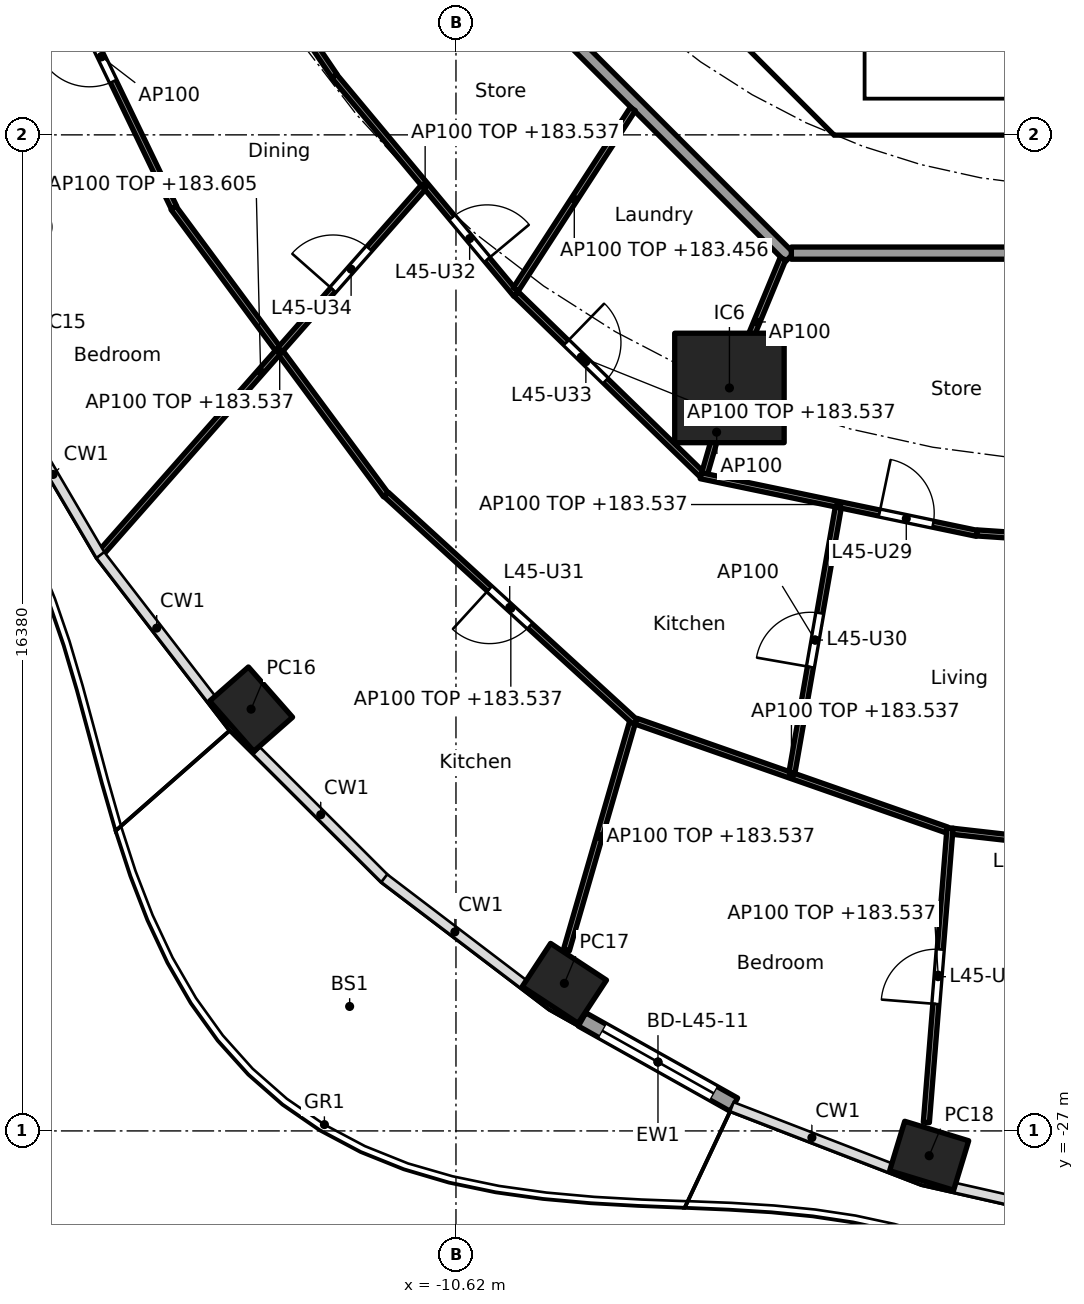
"""IFC4 building model, lengths in metres.
Left out: names, types, materials, properties, quantities, classifications, styles, units other than length and angle.
Written with IfcOpenShell. Run it as: python <this file> out.ifc"""

import sys

from ifc_helpers import new_model, si_unit, direction, frame, frame_2d, origin, origin_2d, place, context, subcontext, project, spatial, polyline, rectangle, hollow_rectangle, outline, extrude, element, fill, save


model = new_model("IFC4")
c1 = context("Model", 3, precision=1e-05, world=origin(), true_north=direction((0.0, 1.0)))
c2 = subcontext(c1, "Body", "Model", "MODEL_VIEW")
j1 = project(units=[si_unit("LENGTHUNIT", "METRE"), si_unit("PLANEANGLEUNIT", "RADIAN")], contexts=[c1])
p1 = place(None, origin())
s1 = spatial("IfcSite", under=j1, at=p1, CompositionType="ELEMENT")
p2 = place(p1, origin())
s2 = spatial("IfcBuilding", under=s1, at=p2, CompositionType="ELEMENT")
p3 = place(p2, frame((0.0, 0.0, 180.7)))
s3 = spatial("IfcBuildingStorey", under=s2, at=p3, CompositionType="ELEMENT", Elevation=180.7)
for number, where, z_axis, x_axis in (
    (1, (-13.989, -20.064, 0.0), (0.0, 0.0, 1.0), (0.66, -0.751, 0.0)),
    (2, (-8.837, -24.573, 0.0), (0.0, 0.0, 1.0), (0.836, -0.549, 0.0)),
    (3, (-2.838, -27.408, 0.0), (0.0, 0.0, 1.0), (0.957, -0.292, 0.0)),
):
    element("IfcColumn", number, at=place(p3, frame(where, z_axis=z_axis, x_axis=x_axis)), inside=s3, PredefinedType="COLUMN", context=c2, shape_type="SweptSolid", body=[
        extrude(hollow_rectangle(XDim=1.1, YDim=0.85, WallThickness=0.036, at=origin_2d()), origin(), (0.0, 0.0, 1.0), 3.7),
    ])
p4 = place(p3, frame((-6.123, -14.782, 0.0), z_axis=(0.0, 0.0, 1.0), x_axis=(1.0, 0.0, 0.0)))
e4 = element("IfcColumn", 4, at=p4, inside=s3, PredefinedType="COLUMN", context=c2, shape_type="SweptSolid", body=[
    extrude(rectangle(XDim=1.8, YDim=1.8, at=origin_2d()), origin(), (0.0, 0.0, 1.0), 3.7),
])
p5 = place(p3, frame((-6.049, -26.568, 0.0), z_axis=(0.0, 0.0, 1.0), x_axis=(-0.872078262455, 0.489366431371, 0.0)))
e5 = element("IfcWall", 5, at=p5, inside=s3, PredefinedType="SOLIDWALL", context=c2, shape_type="SweptSolid", body=[
    extrude(rectangle(XDim=2.864, YDim=0.25, at=frame_2d((1.432, 0.0))), origin(), (0.0, 0.0, 1.0), 3.44),
])
p6 = place(p5, frame((0.382, 0.0, 0.0)))
e6 = element("IfcOpeningElement", 6, at=p6, cuts=e5, PredefinedType="OPENING", context=c2, shape_type="SweptSolid", body=[
    extrude(rectangle(XDim=2.1, YDim=2.4, at=frame_2d((1.05, 1.2))), frame((0.0, 0.135, 0.0), z_axis=(0.0, -1.0, 0.0), x_axis=(1.0, 0.0, 0.0)), (0.0, 0.0, 1.0), 0.27),
])
p7 = place(p3, frame((-9.988, -4.613, 0.0), z_axis=(0.0, 0.0, 1.0), x_axis=(0.707106781187, -0.707106781187, 0.0)))
e7 = element("IfcWall", 7, at=p7, inside=s3, PredefinedType="SHEAR", context=c2, shape_type="SweptSolid", body=[
    extrude(rectangle(XDim=7.602, YDim=0.6, at=frame_2d((3.801, 0.0))), origin(), (0.0, 0.0, 1.0), 3.44),
])
p8 = place(p7, frame((6.151, 0.0, 0.0)))
e8 = element("IfcOpeningElement", 8, at=p8, cuts=e7, PredefinedType="OPENING", context=c2, shape_type="SweptSolid", body=[
    extrude(rectangle(XDim=1.1, YDim=2.1, at=frame_2d((0.55, 1.05))), frame((0.0, 0.31, 0.0), z_axis=(0.0, -1.0, 0.0), x_axis=(1.0, 0.0, 0.0)), (0.0, 0.0, 1.0), 0.62),
])
p9 = place(p3, origin())
e9 = element("IfcWall", 9, at=p9, inside=s3, PredefinedType="SHEAR", context=c2, shape_type="SweptSolid", body=[
    extrude(outline(polyline([(-4.152, -10.025), (4.152, -10.025), (4.401, -9.776), (4.825, -10.2), (4.401, -10.625), (-4.401, -10.625), (-4.825, -10.2), (-4.401, -9.776), (-4.152, -10.025)])), origin(), (0.0, 0.0, 1.0), 3.44),
])
p10 = place(p3, origin())
e10 = element("IfcWall", 10, at=p10, inside=s3, PredefinedType="SOLIDWALL", context=c2, shape_type="SweptSolid", body=[
    extrude(outline(polyline([(-3.9, -10.025), (-4.1, -10.025), (-4.1, -7.025), (-3.9, -7.025), (-3.9, -10.025)])), origin(), (0.0, 0.0, 1.0), 3.44),
])
p11 = place(p3, frame((-12.635, -5.134, 0.0), z_axis=(0.0, 0.0, 1.0), x_axis=(0.707106781187, -0.707106781187, 0.0)))
e11 = element("IfcWall", 11, at=p11, inside=s3, PredefinedType="PARTITIONING", context=c2, shape_type="SweptSolid", body=[
    extrude(rectangle(XDim=10.609, YDim=0.2, at=frame_2d((5.305, 0.0))), origin(), (0.0, 0.0, 1.0), 3.44),
])
p12 = place(p3, frame((-5.104, -12.565, 0.0), z_axis=(0.0, 0.0, 1.0), x_axis=(1.0, 0.0, 0.0)))
e12 = element("IfcWall", 12, at=p12, inside=s3, PredefinedType="PARTITIONING", context=c2, shape_type="SweptSolid", body=[
    extrude(rectangle(XDim=10.409, YDim=0.2, at=frame_2d((5.205, 0.0))), origin(), (0.0, 0.0, 1.0), 3.44),
])
p13 = place(p12, frame((8.074, 0.0, 0.0)))
e13 = element("IfcOpeningElement", 13, at=p13, cuts=e12, PredefinedType="OPENING", context=c2, shape_type="SweptSolid", body=[
    extrude(rectangle(XDim=1.0, YDim=2.1, at=frame_2d((0.5, 1.05))), frame((0.0, 0.11, 0.0), z_axis=(0.0, -1.0, 0.0), x_axis=(1.0, 0.0, 0.0)), (0.0, 0.0, 1.0), 0.22),
])
p14 = place(p3, frame((-14.924, -6.249, 0.0), z_axis=(0.0, 0.0, 1.0), x_axis=(0.561046521684, -0.82778427172, 0.0)))
e14 = element("IfcWall", 14, at=p14, inside=s3, PredefinedType="PARTITIONING", context=c2, shape_type="SweptSolid", body=[
    extrude(rectangle(XDim=4.109, YDim=0.1, at=frame_2d((2.054, 0.0))), origin(), (0.0, 0.0, 1.0), 3.44),
])
p15 = place(p3, frame((-17.647, -6.854, 0.0), z_axis=(0.0, 0.0, 1.0), x_axis=(0.434027506504, -0.900899619046, 0.0)))
e15 = element("IfcWall", 15, at=p15, inside=s3, PredefinedType="PARTITIONING", context=c2, shape_type="SweptSolid", body=[
    extrude(rectangle(XDim=5.508, YDim=0.1, at=frame_2d((2.754, 0.0))), origin(), (0.0, 0.0, 1.0), 3.44),
])
p16 = place(p15, frame((2.304, 0.0, 0.0)))
e16 = element("IfcOpeningElement", 16, at=p16, cuts=e15, PredefinedType="OPENING", context=c2, shape_type="SweptSolid", body=[
    extrude(rectangle(XDim=0.9, YDim=2.1, at=frame_2d((0.45, 1.05))), frame((0.0, 0.06, 0.0), z_axis=(0.0, -1.0, 0.0), x_axis=(1.0, 0.0, 0.0)), (0.0, 0.0, 1.0), 0.12),
])
p17 = place(p3, frame((-12.623, -9.653, 0.0), z_axis=(0.0, 0.0, 1.0), x_axis=(0.640297481347, -0.768127030758, 0.0)))
e17 = element("IfcWall", 17, at=p17, inside=s3, PredefinedType="PARTITIONING", context=c2, shape_type="SweptSolid", body=[
    extrude(rectangle(XDim=4.672, YDim=0.1, at=frame_2d((2.336, 0.0))), origin(), (0.0, 0.0, 1.0), 2.837),
])
p18 = place(p17, frame((3.029, 0.0, 0.0)))
e18 = element("IfcOpeningElement", 18, at=p18, cuts=e17, PredefinedType="OPENING", context=c2, shape_type="SweptSolid", body=[
    extrude(rectangle(XDim=0.9, YDim=2.1, at=frame_2d((0.45, 1.05))), frame((0.0, 0.06, 0.0), z_axis=(0.0, -1.0, 0.0), x_axis=(1.0, 0.0, 0.0)), (0.0, 0.0, 1.0), 0.12),
])
p19 = place(p3, frame((-15.265, -11.821, 0.0), z_axis=(0.0, 0.0, 1.0), x_axis=(0.594711348772, -0.803939308432, 0.0)))
e19 = element("IfcWall", 19, at=p19, inside=s3, PredefinedType="PARTITIONING", context=c2, shape_type="SweptSolid", body=[
    extrude(rectangle(XDim=5.872, YDim=0.1, at=frame_2d((2.936, 0.0))), origin(), (0.0, 0.0, 1.0), 2.837),
])
p20 = place(p3, frame((-11.16, -11.485, 0.0), z_axis=(0.0, 0.0, 1.0), x_axis=(-0.661275898802, -0.750142776852, 0.0)))
e20 = element("IfcWall", 20, at=p20, inside=s3, PredefinedType="PARTITIONING", context=c2, shape_type="SweptSolid", body=[
    extrude(rectangle(XDim=8.083, YDim=0.1, at=frame_2d((4.041, 0.0))), origin(), (0.0, 0.0, 1.0), 2.905),
])
p21 = place(p20, frame((1.341, 0.0, 0.0)))
e21 = element("IfcOpeningElement", 21, at=p21, cuts=e20, PredefinedType="OPENING", context=c2, shape_type="SweptSolid", body=[
    extrude(rectangle(XDim=0.9, YDim=2.1, at=frame_2d((0.45, 1.05))), frame((0.0, 0.06, 0.0), z_axis=(0.0, -1.0, 0.0), x_axis=(1.0, 0.0, 0.0)), (0.0, 0.0, 1.0), 0.12),
])
p22 = place(p3, frame((-7.712, -10.195, 0.0), z_axis=(0.0, 0.0, 1.0), x_axis=(-0.544170086001, -0.838974920663, 0.0)))
e22 = element("IfcWall", 22, at=p22, inside=s3, PredefinedType="PARTITIONING", context=c2, shape_type="SweptSolid", body=[
    extrude(rectangle(XDim=3.535, YDim=0.1, at=frame_2d((1.768, 0.0))), origin(), (0.0, 0.0, 1.0), 2.756),
])
p23 = place(p3, frame((-9.627, -13.238, 0.0), z_axis=(0.0, 0.0, 1.0), x_axis=(0.716946269374, -0.697128429223, 0.0)))
e23 = element("IfcWall", 23, at=p23, inside=s3, PredefinedType="PARTITIONING", context=c2, shape_type="SweptSolid", body=[
    extrude(rectangle(XDim=4.25, YDim=0.1, at=frame_2d((2.125, 0.0))), origin(), (0.0, 0.0, 1.0), 2.837),
])
p24 = place(p23, frame((1.145, 0.0, 0.0)))
e24 = element("IfcOpeningElement", 24, at=p24, cuts=e23, PredefinedType="OPENING", context=c2, shape_type="SweptSolid", body=[
    extrude(rectangle(XDim=0.9, YDim=2.1, at=frame_2d((0.45, 1.05))), frame((0.0, 0.06, 0.0), z_axis=(0.0, -1.0, 0.0), x_axis=(1.0, 0.0, 0.0)), (0.0, 0.0, 1.0), 0.12),
])
p25 = place(p3, frame((-11.766, -16.535, 0.0), z_axis=(0.0, 0.0, 1.0), x_axis=(0.738053852169, -0.674741810842, 0.0)))
e25 = element("IfcWall", 25, at=p25, inside=s3, PredefinedType="PARTITIONING", context=c2, shape_type="SweptSolid", body=[
    extrude(rectangle(XDim=5.549, YDim=0.1, at=frame_2d((2.774, 0.0))), origin(), (0.0, 0.0, 1.0), 2.837),
])
p26 = place(p25, frame((2.3, 0.0, 0.0)))
e26 = element("IfcOpeningElement", 26, at=p26, cuts=e25, PredefinedType="OPENING", context=c2, shape_type="SweptSolid", body=[
    extrude(rectangle(XDim=0.9, YDim=2.1, at=frame_2d((0.45, 1.05))), frame((0.0, 0.06, 0.0), z_axis=(0.0, -1.0, 0.0), x_axis=(1.0, 0.0, 0.0)), (0.0, 0.0, 1.0), 0.12),
])
p27 = place(p3, frame((-5.243, -12.657, 0.0), z_axis=(0.0, 0.0, 1.0), x_axis=(-0.382719158442, -0.923864733477, 0.0)))
e27 = element("IfcWall", 27, at=p27, inside=s3, PredefinedType="PARTITIONING", context=c2, shape_type="SweptSolid", body=[
    extrude(rectangle(XDim=2.25, YDim=0.1, at=frame_2d((1.125, 0.0))), origin(), (0.0, 0.0, 1.0), 3.44),
])
p28 = place(p3, frame((-6.137, -14.831, 0.0), z_axis=(0.0, 0.0, 1.0), x_axis=(-0.2785069197, -0.960434222464, 0.0)))
e28 = element("IfcWall", 28, at=p28, inside=s3, PredefinedType="PARTITIONING", context=c2, shape_type="SweptSolid", body=[
    extrude(rectangle(XDim=1.413, YDim=0.1, at=frame_2d((0.707, 0.0))), origin(), (0.0, 0.0, 1.0), 3.44),
])
p29 = place(p3, frame((-6.594, -16.226, 0.0), z_axis=(0.0, 0.0, 1.0), x_axis=(0.978899284405, -0.204343316484, 0.0)))
e29 = element("IfcWall", 29, at=p29, inside=s3, PredefinedType="PARTITIONING", context=c2, shape_type="SweptSolid", body=[
    extrude(rectangle(XDim=4.636, YDim=0.1, at=frame_2d((2.318, 0.0))), origin(), (0.0, 0.0, 1.0), 2.837),
])
p30 = place(p29, frame((3.002, 0.0, 0.0)))
e30 = element("IfcOpeningElement", 30, at=p30, cuts=e29, PredefinedType="OPENING", context=c2, shape_type="SweptSolid", body=[
    extrude(rectangle(XDim=0.9, YDim=2.1, at=frame_2d((0.45, 1.05))), frame((0.0, 0.06, 0.0), z_axis=(0.0, -1.0, 0.0), x_axis=(1.0, 0.0, 0.0)), (0.0, 0.0, 1.0), 0.12),
])
p31 = place(p3, frame((-7.721, -20.293, 0.0), z_axis=(0.0, 0.0, 1.0), x_axis=(-0.278445616281, -0.960451997121, 0.0)))
e31 = element("IfcWall", 31, at=p31, inside=s3, PredefinedType="PARTITIONING", context=c2, shape_type="SweptSolid", body=[
    extrude(rectangle(XDim=3.885, YDim=0.1, at=frame_2d((1.942, 0.0))), origin(), (0.0, 0.0, 1.0), 2.837),
])
p32 = place(p3, frame((-7.66, -20.262, 0.0), z_axis=(0.0, 0.0, 1.0), x_axis=(0.943911038661, -0.330199865375, 0.0)))
e32 = element("IfcWall", 32, at=p32, inside=s3, PredefinedType="PARTITIONING", context=c2, shape_type="SweptSolid", body=[
    extrude(rectangle(XDim=5.417, YDim=0.1, at=frame_2d((2.709, 0.0))), origin(), (0.0, 0.0, 1.0), 2.837),
])
p33 = place(p3, frame((-4.333, -16.749, 0.0), z_axis=(0.0, 0.0, 1.0), x_axis=(-0.172053721569, -0.985087568135, 0.0)))
e33 = element("IfcWall", 33, at=p33, inside=s3, PredefinedType="PARTITIONING", context=c2, shape_type="SweptSolid", body=[
    extrude(rectangle(XDim=4.424, YDim=0.1, at=frame_2d((2.212, 0.0))), origin(), (0.0, 0.0, 1.0), 3.44),
])
p34 = place(p33, frame((1.762, 0.0, 0.0)))
e34 = element("IfcOpeningElement", 34, at=p34, cuts=e33, PredefinedType="OPENING", context=c2, shape_type="SweptSolid", body=[
    extrude(rectangle(XDim=0.9, YDim=2.1, at=frame_2d((0.45, 1.05))), frame((0.0, 0.06, 0.0), z_axis=(0.0, -1.0, 0.0), x_axis=(1.0, 0.0, 0.0)), (0.0, 0.0, 1.0), 0.12),
])
p35 = place(p3, frame((-2.055, -17.166, 0.0), z_axis=(0.0, 0.0, 1.0), x_axis=(0.997754717554, -0.066974051687, 0.0)))
e35 = element("IfcWall", 35, at=p35, inside=s3, PredefinedType="PARTITIONING", context=c2, shape_type="SweptSolid", body=[
    extrude(rectangle(XDim=4.309, YDim=0.1, at=frame_2d((2.154, 0.0))), origin(), (0.0, 0.0, 1.0), 2.837),
])
p36 = place(p3, frame((-2.495, -22.017, 0.0), z_axis=(0.0, 0.0, 1.0), x_axis=(-0.080150660566, -0.99678276049, 0.0)))
e36 = element("IfcWall", 36, at=p36, inside=s3, PredefinedType="PARTITIONING", context=c2, shape_type="SweptSolid", body=[
    extrude(rectangle(XDim=4.858, YDim=0.1, at=frame_2d((2.429, 0.0))), origin(), (0.0, 0.0, 1.0), 2.837),
])
p37 = place(p36, frame((2.004, 0.0, 0.0)))
e37 = element("IfcOpeningElement", 37, at=p37, cuts=e36, PredefinedType="OPENING", context=c2, shape_type="SweptSolid", body=[
    extrude(rectangle(XDim=0.9, YDim=2.1, at=frame_2d((0.45, 1.05))), frame((0.0, 0.06, 0.0), z_axis=(0.0, -1.0, 0.0), x_axis=(1.0, 0.0, 0.0)), (0.0, 0.0, 1.0), 0.12),
])
p38 = place(p3, frame((-2.449, -22.073, 0.0), z_axis=(0.0, 0.0, 1.0), x_axis=(0.993660315081, -0.112424099879, 0.0)))
e38 = element("IfcWall", 38, at=p38, inside=s3, PredefinedType="PARTITIONING", context=c2, shape_type="SweptSolid", body=[
    extrude(rectangle(XDim=5.325, YDim=0.1, at=frame_2d((2.662, 0.0))), origin(), (0.0, 0.0, 1.0), 2.837),
])
p39 = place(p38, frame((0.881, 0.0, 0.0)))
e39 = element("IfcOpeningElement", 39, at=p39, cuts=e38, PredefinedType="OPENING", context=c2, shape_type="SweptSolid", body=[
    extrude(rectangle(XDim=0.9, YDim=2.1, at=frame_2d((0.45, 1.05))), frame((0.0, 0.06, 0.0), z_axis=(0.0, -1.0, 0.0), x_axis=(1.0, 0.0, 0.0)), (0.0, 0.0, 1.0), 0.12),
])
p40 = place(p6, origin())
e40 = element("IfcDoor", 40, at=p40, inside=s3, OperationType="SLIDING_TO_LEFT", PredefinedType="DOOR", context=c2, shape_type="SweptSolid", body=[
    extrude(rectangle(XDim=2.1, YDim=2.4, at=frame_2d((1.05, 1.2))), frame((0.0, 0.025, 0.0), z_axis=(0.0, -1.0, 0.0), x_axis=(1.0, 0.0, 0.0)), (0.0, 0.0, 1.0), 0.05),
])
fill(e6, e40)
p41 = place(p8, origin())
e41 = element("IfcDoor", 41, at=p41, inside=s3, OperationType="SINGLE_SWING_LEFT", PredefinedType="DOOR", context=c2, shape_type="SweptSolid", body=[
    extrude(rectangle(XDim=1.1, YDim=2.1, at=frame_2d((0.55, 1.05))), frame((0.0, 0.025, 0.0), z_axis=(0.0, -1.0, 0.0), x_axis=(1.0, 0.0, 0.0)), (0.0, 0.0, 1.0), 0.05),
])
fill(e8, e41)
p42 = place(p37, frame((0.9, 0.0, 0.0), x_axis=(-1.0, 0.0, 0.0)))
e42 = element("IfcDoor", 42, at=p42, inside=s3, OperationType="SINGLE_SWING_LEFT", PredefinedType="DOOR", context=c2, shape_type="SweptSolid", body=[
    extrude(rectangle(XDim=0.9, YDim=2.1, at=frame_2d((0.45, 1.05))), frame((0.0, 0.025, 0.0), z_axis=(0.0, -1.0, 0.0), x_axis=(1.0, 0.0, 0.0)), (0.0, 0.0, 1.0), 0.05),
])
fill(e37, e42)
p43 = place(p30, origin())
e43 = element("IfcDoor", 43, at=p43, inside=s3, OperationType="SINGLE_SWING_LEFT", PredefinedType="DOOR", context=c2, shape_type="SweptSolid", body=[
    extrude(rectangle(XDim=0.9, YDim=2.1, at=frame_2d((0.45, 1.05))), frame((0.0, 0.025, 0.0), z_axis=(0.0, -1.0, 0.0), x_axis=(1.0, 0.0, 0.0)), (0.0, 0.0, 1.0), 0.05),
])
fill(e30, e43)
p44 = place(p34, frame((0.9, 0.0, 0.0), x_axis=(-1.0, 0.0, 0.0)))
e44 = element("IfcDoor", 44, at=p44, inside=s3, OperationType="SINGLE_SWING_LEFT", PredefinedType="DOOR", context=c2, shape_type="SweptSolid", body=[
    extrude(rectangle(XDim=0.9, YDim=2.1, at=frame_2d((0.45, 1.05))), frame((0.0, 0.025, 0.0), z_axis=(0.0, -1.0, 0.0), x_axis=(1.0, 0.0, 0.0)), (0.0, 0.0, 1.0), 0.05),
])
fill(e34, e44)
p45 = place(p26, frame((0.9, 0.0, 0.0), x_axis=(-1.0, 0.0, 0.0)))
e45 = element("IfcDoor", 45, at=p45, inside=s3, OperationType="SINGLE_SWING_RIGHT", PredefinedType="DOOR", context=c2, shape_type="SweptSolid", body=[
    extrude(rectangle(XDim=0.9, YDim=2.1, at=frame_2d((0.45, 1.05))), frame((0.0, 0.025, 0.0), z_axis=(0.0, -1.0, 0.0), x_axis=(1.0, 0.0, 0.0)), (0.0, 0.0, 1.0), 0.05),
])
fill(e26, e45)
p46 = place(p18, origin())
e46 = element("IfcDoor", 46, at=p46, inside=s3, OperationType="SINGLE_SWING_RIGHT", PredefinedType="DOOR", context=c2, shape_type="SweptSolid", body=[
    extrude(rectangle(XDim=0.9, YDim=2.1, at=frame_2d((0.45, 1.05))), frame((0.0, 0.025, 0.0), z_axis=(0.0, -1.0, 0.0), x_axis=(1.0, 0.0, 0.0)), (0.0, 0.0, 1.0), 0.05),
])
fill(e18, e46)
p47 = place(p24, origin())
e47 = element("IfcDoor", 47, at=p47, inside=s3, OperationType="SINGLE_SWING_LEFT", PredefinedType="DOOR", context=c2, shape_type="SweptSolid", body=[
    extrude(rectangle(XDim=0.9, YDim=2.1, at=frame_2d((0.45, 1.05))), frame((0.0, 0.025, 0.0), z_axis=(0.0, -1.0, 0.0), x_axis=(1.0, 0.0, 0.0)), (0.0, 0.0, 1.0), 0.05),
])
fill(e24, e47)
p48 = place(p21, frame((0.9, 0.0, 0.0), x_axis=(-1.0, 0.0, 0.0)))
e48 = element("IfcDoor", 48, at=p48, inside=s3, OperationType="SINGLE_SWING_LEFT", PredefinedType="DOOR", context=c2, shape_type="SweptSolid", body=[
    extrude(rectangle(XDim=0.9, YDim=2.1, at=frame_2d((0.45, 1.05))), frame((0.0, 0.025, 0.0), z_axis=(0.0, -1.0, 0.0), x_axis=(1.0, 0.0, 0.0)), (0.0, 0.0, 1.0), 0.05),
])
fill(e21, e48)
p49 = place(p16, frame((0.9, 0.0, 0.0), x_axis=(-1.0, 0.0, 0.0)))
e49 = element("IfcDoor", 49, at=p49, inside=s3, OperationType="SINGLE_SWING_RIGHT", PredefinedType="DOOR", context=c2, shape_type="SweptSolid", body=[
    extrude(rectangle(XDim=0.9, YDim=2.1, at=frame_2d((0.45, 1.05))), frame((0.0, 0.025, 0.0), z_axis=(0.0, -1.0, 0.0), x_axis=(1.0, 0.0, 0.0)), (0.0, 0.0, 1.0), 0.05),
])
fill(e16, e49)
save(model, sys.argv[1])
